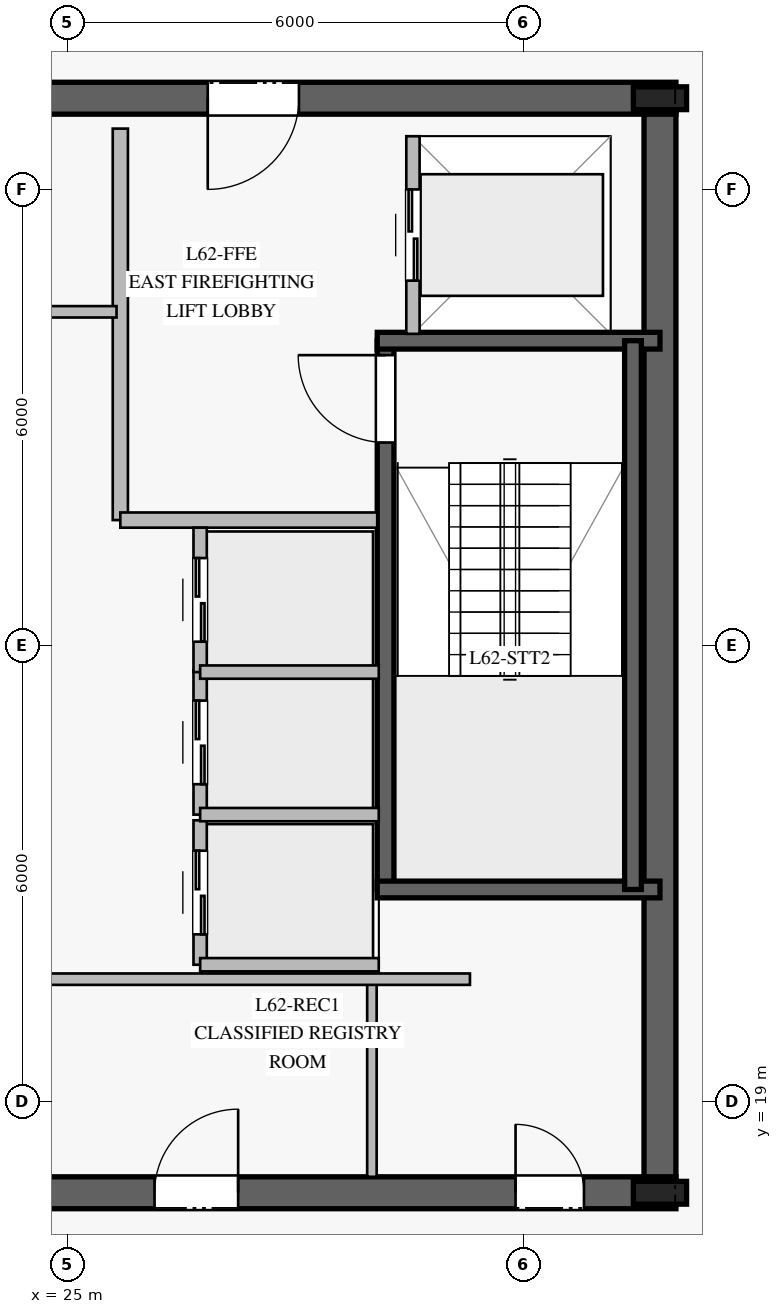
"""IFC4 building model, lengths in metres.
Left out: names, types, materials, properties, quantities, classifications, styles, units other than length and angle.
Written with IfcOpenShell. Run it as: python <this file> out.ifc"""

import sys

from ifc_helpers import new_model, si_unit, direction, frame, frame_2d, origin, origin_2d, place, context, subcontext, project, spatial, rectangle, i_section, extrude, element, fill, save


model = new_model("IFC4")
c1 = context("Model", 3, precision=1e-05, world=origin(), true_north=direction((0.0, 1.0)))
c2 = subcontext(c1, "Body", "Model", "MODEL_VIEW")
j1 = project(units=[si_unit("LENGTHUNIT", "METRE"), si_unit("PLANEANGLEUNIT", "RADIAN")], contexts=[c1])
p1 = place(None, origin())
s1 = spatial("IfcSite", under=j1, at=p1, CompositionType="ELEMENT")
p2 = place(p1, origin())
s2 = spatial("IfcBuilding", under=s1, at=p2, CompositionType="ELEMENT")
p3 = place(p2, frame((0.0, 0.0, 258.2)))
s3 = spatial("IfcBuildingStorey", under=s2, at=p3, CompositionType="ELEMENT", Elevation=258.2)
p4 = place(p3, frame((16.99, 17.8, 0.0), z_axis=(0.0, 0.0, 1.0), x_axis=(1.0, 0.0, 0.0)))
e1 = element("IfcWall", 1, at=p4, inside=s3, PredefinedType="SHEAR", context=c2, shape_type="SweptSolid", body=[
    extrude(rectangle(XDim=16.02, YDim=0.42, at=frame_2d((8.01, 0.0))), origin(), (0.0, 0.0, 1.0), 3.78),
])
p5 = place(p4, frame((4.96, 0.0, 0.0)))
e2 = element("IfcOpeningElement", 2, at=p5, cuts=e1, PredefinedType="OPENING", context=c2, shape_type="SweptSolid", body=[
    extrude(rectangle(XDim=1.2, YDim=2.25, at=frame_2d((0.6, 1.125))), frame((0.0, 0.22, 0.0), z_axis=(0.0, -1.0, 0.0), x_axis=(1.0, 0.0, 0.0)), (0.0, 0.0, 1.0), 0.44),
])
p6 = place(p4, frame((13.91, 0.0, 0.0)))
e3 = element("IfcOpeningElement", 3, at=p6, cuts=e1, PredefinedType="OPENING", context=c2, shape_type="SweptSolid", body=[
    extrude(rectangle(XDim=0.9, YDim=2.1, at=frame_2d((0.45, 1.05))), frame((0.0, 0.22, 0.0), z_axis=(0.0, -1.0, 0.0), x_axis=(1.0, 0.0, 0.0)), (0.0, 0.0, 1.0), 0.44),
])
p7 = place(p4, frame((9.16, 0.0, 0.0)))
e4 = element("IfcOpeningElement", 4, at=p7, cuts=e1, PredefinedType="OPENING", context=c2, shape_type="SweptSolid", body=[
    extrude(rectangle(XDim=1.1, YDim=2.2, at=frame_2d((0.55, 1.1))), frame((0.0, 0.22, 0.0), z_axis=(0.0, -1.0, 0.0), x_axis=(1.0, 0.0, 0.0)), (0.0, 0.0, 1.0), 0.44),
])
p8 = place(p3, frame((33.01, 32.2, 0.0), z_axis=(0.0, 0.0, 1.0), x_axis=(-1.0, 0.0, 0.0)))
e5 = element("IfcWall", 5, at=p8, inside=s3, PredefinedType="SHEAR", context=c2, shape_type="SweptSolid", body=[
    extrude(rectangle(XDim=16.02, YDim=0.42, at=frame_2d((8.01, 0.0))), origin(), (0.0, 0.0, 1.0), 3.78),
])
p9 = place(p8, frame((4.96, 0.0, 0.0)))
e6 = element("IfcOpeningElement", 6, at=p9, cuts=e5, PredefinedType="OPENING", context=c2, shape_type="SweptSolid", body=[
    extrude(rectangle(XDim=1.2, YDim=2.25, at=frame_2d((0.6, 1.125))), frame((0.0, 0.22, 0.0), z_axis=(0.0, -1.0, 0.0), x_axis=(1.0, 0.0, 0.0)), (0.0, 0.0, 1.0), 0.44),
])
p10 = place(p8, frame((9.785, 0.0, 0.0)))
e7 = element("IfcOpeningElement", 7, at=p10, cuts=e5, PredefinedType="OPENING", context=c2, shape_type="SweptSolid", body=[
    extrude(rectangle(XDim=1.1, YDim=2.2, at=frame_2d((0.55, 1.1))), frame((0.0, 0.22, 0.0), z_axis=(0.0, -1.0, 0.0), x_axis=(1.0, 0.0, 0.0)), (0.0, 0.0, 1.0), 0.44),
])
p11 = place(p3, frame((32.8, 18.01, 0.0), z_axis=(0.0, 0.0, 1.0), x_axis=(0.0, 1.0, 0.0)))
e8 = element("IfcWall", 8, at=p11, inside=s3, PredefinedType="SHEAR", context=c2, shape_type="SweptSolid", body=[
    extrude(rectangle(XDim=13.98, YDim=0.42, at=frame_2d((6.99, 0.0))), origin(), (0.0, 0.0, 1.0), 3.78),
])
for number, where, z_axis, x_axis in (
    (9, (32.8, 17.8, 0.0), (0.0, 0.0, 1.0), (1.0, 0.0, 0.0)),
    (10, (32.8, 32.2, 0.0), (0.0, 0.0, 1.0), (1.0, 0.0, 0.0)),
):
    element("IfcColumn", number, at=place(p3, frame(where, z_axis=z_axis, x_axis=x_axis)), inside=s3, PredefinedType="COLUMN", context=c2, shape_type="SweptSolid", body=[
        extrude(i_section(OverallWidth=0.3, OverallDepth=0.7, WebThickness=0.017, FlangeThickness=0.032, at=origin_2d()), origin(), (0.0, 0.0, 1.0), 4.0),
    ])
p12 = place(p3, frame((29.19, 21.79, 0.0), z_axis=(0.0, 0.0, 1.0), x_axis=(0.0, 1.0, 0.0)))
e11 = element("IfcWall", 11, at=p12, inside=s3, PredefinedType="SOLIDWALL", context=c2, shape_type="SweptSolid", body=[
    extrude(rectangle(XDim=7.22, YDim=0.22, at=frame_2d((3.61, 0.0))), origin(), (0.0, 0.0, 1.0), 3.78),
])
p13 = place(p12, frame((5.88, 0.0, 0.0)))
e12 = element("IfcOpeningElement", 12, at=p13, cuts=e11, PredefinedType="OPENING", context=c2, shape_type="SweptSolid", body=[
    extrude(rectangle(XDim=1.15, YDim=2.2, at=frame_2d((0.575, 1.1))), frame((0.0, 0.12, 0.0), z_axis=(0.0, -1.0, 0.0), x_axis=(1.0, 0.0, 0.0)), (0.0, 0.0, 1.0), 0.24),
])
for number, where, z_axis, x_axis in (
    (13, (29.08, 21.79, 0.0), (0.0, 0.0, 1.0), (1.0, 0.0, 0.0)),
    (14, (29.08, 29.01, 0.0), (0.0, 0.0, 1.0), (1.0, 0.0, 0.0)),
):
    element("IfcWall", number, at=place(p3, frame(where, z_axis=z_axis, x_axis=x_axis)), inside=s3, PredefinedType="SOLIDWALL", context=c2, shape_type="SweptSolid", body=[
        extrude(rectangle(XDim=3.72, YDim=0.22, at=frame_2d((1.86, 0.0))), origin(), (0.0, 0.0, 1.0), 3.78),
    ])
p14 = place(p3, frame((32.445, 29.01, 0.0), z_axis=(0.0, 0.0, 1.0), x_axis=(0.0, -1.0, 0.0)))
e15 = element("IfcWall", 15, at=p14, inside=s3, PredefinedType="SOLIDWALL", context=c2, shape_type="SweptSolid", body=[
    extrude(rectangle(XDim=7.22, YDim=0.22, at=frame_2d((3.61, 0.0))), origin(), (0.0, 0.0, 1.0), 3.78),
])
p15 = place(p3, frame((25.7, 26.65, 0.0), z_axis=(0.0, 0.0, 1.0), x_axis=(0.0, 1.0, 0.0)))
e16 = element("IfcWall", 16, at=p15, inside=s3, PredefinedType="PARTITIONING", context=c2, shape_type="SweptSolid", body=[
    extrude(rectangle(XDim=5.15, YDim=0.2, at=frame_2d((2.575, 0.0))), origin(), (0.0, 0.0, 1.0), 3.78),
])
p16 = place(p3, frame((25.7, 26.65, 0.0), z_axis=(0.0, 0.0, 1.0), x_axis=(1.0, 0.0, 0.0)))
e17 = element("IfcWall", 17, at=p16, inside=s3, PredefinedType="PARTITIONING", context=c2, shape_type="SweptSolid", body=[
    extrude(rectangle(XDim=3.38, YDim=0.2, at=frame_2d((1.69, 0.0))), origin(), (0.0, 0.0, 1.0), 3.78),
])
p17 = place(p3, frame((29.01, 18.01, 0.0), z_axis=(0.0, 0.0, 1.0), x_axis=(0.0, 1.0, 0.0)))
e18 = element("IfcWall", 18, at=p17, inside=s3, PredefinedType="PARTITIONING", context=c2, shape_type="SweptSolid", body=[
    extrude(rectangle(XDim=2.54, YDim=0.125, at=frame_2d((1.27, 0.0))), origin(), (0.0, 0.0, 1.0), 3.78),
])
p18 = place(p3, frame((24.4, 20.61, 0.0), z_axis=(0.0, 0.0, 1.0), x_axis=(1.0, 0.0, 0.0)))
e19 = element("IfcWall", 19, at=p18, inside=s3, PredefinedType="PARTITIONING", context=c2, shape_type="SweptSolid", body=[
    extrude(rectangle(XDim=5.9, YDim=0.15, at=frame_2d((2.95, 0.0))), origin(), (0.0, 0.0, 1.0), 3.78),
])
p19 = place(p3, frame((19.75, 29.39, 0.0), z_axis=(0.0, 0.0, 1.0), x_axis=(1.0, 0.0, 0.0)))
e20 = element("IfcWall", 20, at=p19, inside=s3, PredefinedType="PARTITIONING", context=c2, shape_type="SweptSolid", body=[
    extrude(rectangle(XDim=5.9, YDim=0.15, at=frame_2d((2.95, 0.0))), origin(), (0.0, 0.0, 1.0), 3.78),
])
p20 = place(p3, frame((26.75, 20.8, 0.0), z_axis=(0.0, 0.0, 1.0), x_axis=(0.0, 1.0, 0.0)))
e21 = element("IfcWall", 21, at=p20, inside=s3, PredefinedType="PARTITIONING", context=c2, shape_type="SweptSolid", body=[
    extrude(rectangle(XDim=1.9, YDim=0.175, at=frame_2d((0.95, 0.0))), origin(), (0.0, 0.0, 1.0), 3.78),
])
p21 = place(p20, frame((0.4, 0.0, 0.0)))
e22 = element("IfcOpeningElement", 22, at=p21, cuts=e21, PredefinedType="OPENING", context=c2, shape_type="SweptSolid", body=[
    extrude(rectangle(XDim=1.1, YDim=2.2, at=frame_2d((0.55, 1.1))), frame((0.0, 0.098, 0.0), z_axis=(0.0, -1.0, 0.0), x_axis=(1.0, 0.0, 0.0)), (0.0, 0.0, 1.0), 0.195),
])
p22 = place(p3, frame((26.75, 20.8, 0.0), z_axis=(0.0, 0.0, 1.0), x_axis=(1.0, 0.0, 0.0)))
e23 = element("IfcWall", 23, at=p22, inside=s3, PredefinedType="PARTITIONING", context=c2, shape_type="SweptSolid", body=[
    extrude(rectangle(XDim=2.35, YDim=0.175, at=frame_2d((1.175, 0.0))), origin(), (0.0, 0.0, 1.0), 3.78),
])
p23 = place(p3, frame((26.75, 22.775, 0.0), z_axis=(0.0, 0.0, 1.0), x_axis=(0.0, 1.0, 0.0)))
e24 = element("IfcWall", 24, at=p23, inside=s3, PredefinedType="PARTITIONING", context=c2, shape_type="SweptSolid", body=[
    extrude(rectangle(XDim=1.9, YDim=0.175, at=frame_2d((0.95, 0.0))), origin(), (0.0, 0.0, 1.0), 3.78),
])
p24 = place(p23, frame((0.4, 0.0, 0.0)))
e25 = element("IfcOpeningElement", 25, at=p24, cuts=e24, PredefinedType="OPENING", context=c2, shape_type="SweptSolid", body=[
    extrude(rectangle(XDim=1.1, YDim=2.2, at=frame_2d((0.55, 1.1))), frame((0.0, 0.098, 0.0), z_axis=(0.0, -1.0, 0.0), x_axis=(1.0, 0.0, 0.0)), (0.0, 0.0, 1.0), 0.195),
])
p25 = place(p3, frame((26.75, 22.775, 0.0), z_axis=(0.0, 0.0, 1.0), x_axis=(1.0, 0.0, 0.0)))
e26 = element("IfcWall", 26, at=p25, inside=s3, PredefinedType="PARTITIONING", context=c2, shape_type="SweptSolid", body=[
    extrude(rectangle(XDim=2.35, YDim=0.175, at=frame_2d((1.175, 0.0))), origin(), (0.0, 0.0, 1.0), 3.78),
])
p26 = place(p3, frame((26.75, 24.65, 0.0), z_axis=(0.0, 0.0, 1.0), x_axis=(0.0, 1.0, 0.0)))
e27 = element("IfcWall", 27, at=p26, inside=s3, PredefinedType="PARTITIONING", context=c2, shape_type="SweptSolid", body=[
    extrude(rectangle(XDim=1.9, YDim=0.175, at=frame_2d((0.95, 0.0))), origin(), (0.0, 0.0, 1.0), 3.78),
])
p27 = place(p26, frame((0.4, 0.0, 0.0)))
e28 = element("IfcOpeningElement", 28, at=p27, cuts=e27, PredefinedType="OPENING", context=c2, shape_type="SweptSolid", body=[
    extrude(rectangle(XDim=1.1, YDim=2.2, at=frame_2d((0.55, 1.1))), frame((0.0, 0.098, 0.0), z_axis=(0.0, -1.0, 0.0), x_axis=(1.0, 0.0, 0.0)), (0.0, 0.0, 1.0), 0.195),
])
p28 = place(p3, frame((26.75, 24.65, 0.0), z_axis=(0.0, 0.0, 1.0), x_axis=(1.0, 0.0, 0.0)))
e29 = element("IfcWall", 29, at=p28, inside=s3, PredefinedType="PARTITIONING", context=c2, shape_type="SweptSolid", body=[
    extrude(rectangle(XDim=2.35, YDim=0.175, at=frame_2d((1.175, 0.0))), origin(), (0.0, 0.0, 1.0), 3.78),
])
p29 = place(p3, frame((29.55, 29.1, 0.0), z_axis=(0.0, 0.0, 1.0), x_axis=(0.0, 1.0, 0.0)))
e30 = element("IfcWall", 30, at=p29, inside=s3, PredefinedType="PARTITIONING", context=c2, shape_type="SweptSolid", body=[
    extrude(rectangle(XDim=2.6, YDim=0.175, at=frame_2d((1.3, 0.0))), origin(), (0.0, 0.0, 1.0), 3.78),
])
p30 = place(p29, frame((0.7, 0.0, 0.0)))
e31 = element("IfcOpeningElement", 31, at=p30, cuts=e30, PredefinedType="OPENING", context=c2, shape_type="SweptSolid", body=[
    extrude(rectangle(XDim=1.2, YDim=2.2, at=frame_2d((0.6, 1.1))), frame((0.0, 0.098, 0.0), z_axis=(0.0, -1.0, 0.0), x_axis=(1.0, 0.0, 0.0)), (0.0, 0.0, 1.0), 0.195),
])
p31 = place(p13, origin())
e32 = element("IfcDoor", 32, at=p31, inside=s3, OperationType="SINGLE_SWING_RIGHT", PredefinedType="DOOR", context=c2, shape_type="SweptSolid", body=[
    extrude(rectangle(XDim=1.15, YDim=2.2, at=frame_2d((0.575, 1.1))), frame((0.0, 0.025, 0.0), z_axis=(0.0, -1.0, 0.0), x_axis=(1.0, 0.0, 0.0)), (0.0, 0.0, 1.0), 0.05),
])
fill(e12, e32)
p32 = place(p9, origin())
e33 = element("IfcDoor", 33, at=p32, inside=s3, OperationType="SINGLE_SWING_RIGHT", PredefinedType="DOOR", context=c2, shape_type="SweptSolid", body=[
    extrude(rectangle(XDim=1.2, YDim=2.25, at=frame_2d((0.6, 1.125))), frame((0.0, 0.025, 0.0), z_axis=(0.0, -1.0, 0.0), x_axis=(1.0, 0.0, 0.0)), (0.0, 0.0, 1.0), 0.05),
])
fill(e6, e33)
p33 = place(p6, origin())
e34 = element("IfcDoor", 34, at=p33, inside=s3, OperationType="SINGLE_SWING_LEFT", PredefinedType="DOOR", context=c2, shape_type="SweptSolid", body=[
    extrude(rectangle(XDim=0.9, YDim=2.1, at=frame_2d((0.45, 1.05))), frame((0.0, 0.025, 0.0), z_axis=(0.0, -1.0, 0.0), x_axis=(1.0, 0.0, 0.0)), (0.0, 0.0, 1.0), 0.05),
])
fill(e3, e34)
p34 = place(p7, origin())
e35 = element("IfcDoor", 35, at=p34, inside=s3, OperationType="SINGLE_SWING_RIGHT", PredefinedType="DOOR", context=c2, shape_type="SweptSolid", body=[
    extrude(rectangle(XDim=1.1, YDim=2.2, at=frame_2d((0.55, 1.1))), frame((0.0, 0.025, 0.0), z_axis=(0.0, -1.0, 0.0), x_axis=(1.0, 0.0, 0.0)), (0.0, 0.0, 1.0), 0.05),
])
fill(e4, e35)
p35 = place(p21, origin())
e36 = element("IfcDoor", 36, at=p35, inside=s3, OperationType="DOUBLE_DOOR_SLIDING", PredefinedType="DOOR", context=c2, shape_type="SweptSolid", body=[
    extrude(rectangle(XDim=1.1, YDim=2.2, at=frame_2d((0.55, 1.1))), frame((0.0, 0.025, 0.0), z_axis=(0.0, -1.0, 0.0), x_axis=(1.0, 0.0, 0.0)), (0.0, 0.0, 1.0), 0.05),
])
fill(e22, e36)
p36 = place(p24, origin())
e37 = element("IfcDoor", 37, at=p36, inside=s3, OperationType="DOUBLE_DOOR_SLIDING", PredefinedType="DOOR", context=c2, shape_type="SweptSolid", body=[
    extrude(rectangle(XDim=1.1, YDim=2.2, at=frame_2d((0.55, 1.1))), frame((0.0, 0.025, 0.0), z_axis=(0.0, -1.0, 0.0), x_axis=(1.0, 0.0, 0.0)), (0.0, 0.0, 1.0), 0.05),
])
fill(e25, e37)
p37 = place(p27, origin())
e38 = element("IfcDoor", 38, at=p37, inside=s3, OperationType="DOUBLE_DOOR_SLIDING", PredefinedType="DOOR", context=c2, shape_type="SweptSolid", body=[
    extrude(rectangle(XDim=1.1, YDim=2.2, at=frame_2d((0.55, 1.1))), frame((0.0, 0.025, 0.0), z_axis=(0.0, -1.0, 0.0), x_axis=(1.0, 0.0, 0.0)), (0.0, 0.0, 1.0), 0.05),
])
fill(e28, e38)
p38 = place(p30, origin())
e39 = element("IfcDoor", 39, at=p38, inside=s3, OperationType="DOUBLE_DOOR_SLIDING", PredefinedType="DOOR", context=c2, shape_type="SweptSolid", body=[
    extrude(rectangle(XDim=1.2, YDim=2.2, at=frame_2d((0.6, 1.1))), frame((0.0, 0.025, 0.0), z_axis=(0.0, -1.0, 0.0), x_axis=(1.0, 0.0, 0.0)), (0.0, 0.0, 1.0), 0.05),
])
fill(e31, e39)
save(model, sys.argv[1])
